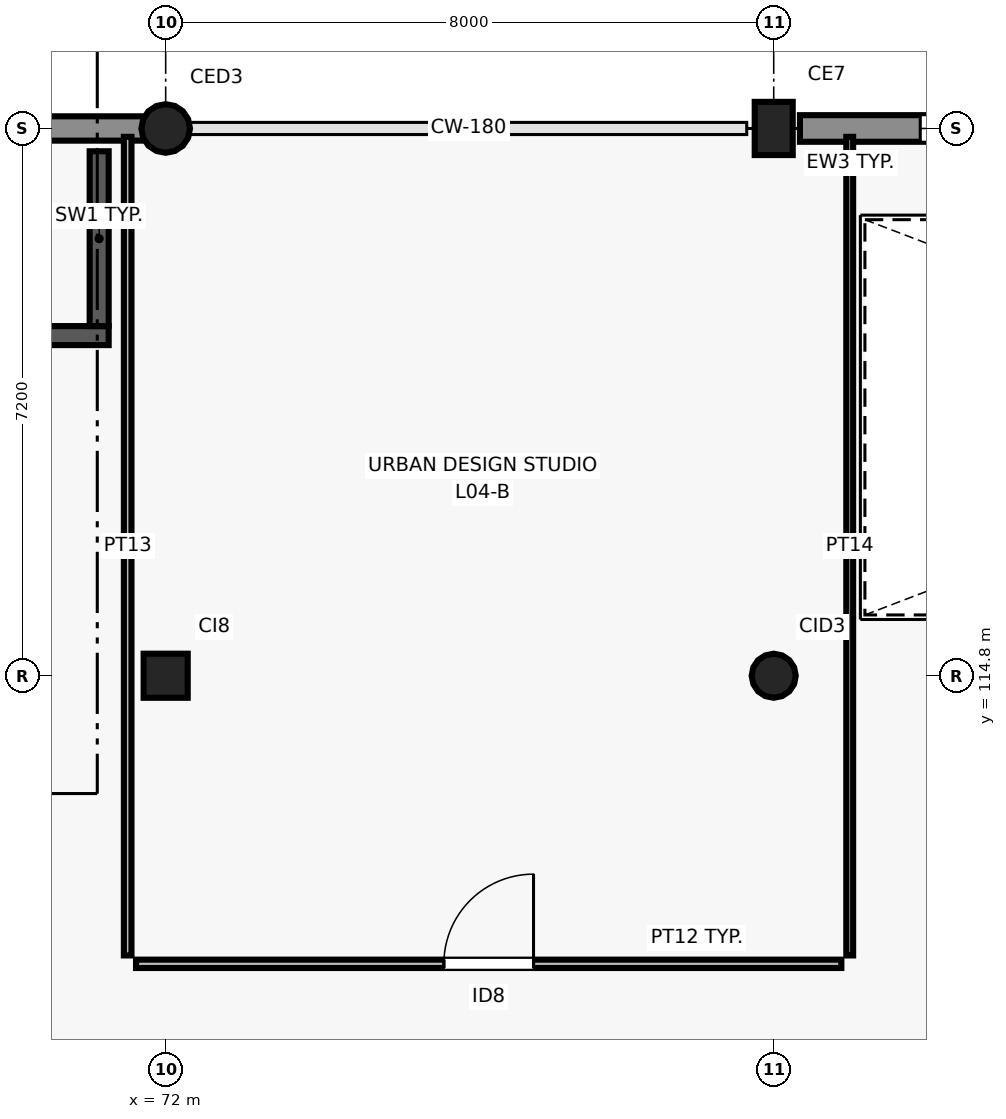
"""IFC4 building model, lengths in metres.
Left out: names, types, materials, properties, quantities, classifications, styles, units other than length and angle.
Written with IfcOpenShell. Run it as: python <this file> out.ifc"""

import sys

from ifc_helpers import new_model, si_unit, direction, frame, frame_2d, origin, origin_2d, place, context, subcontext, project, spatial, rectangle, circle, extrude, element, fill, save


model = new_model("IFC4")
c1 = context("Model", 3, precision=1e-05, world=origin(), true_north=direction((0.0, 1.0)))
c2 = subcontext(c1, "Body", "Model", "MODEL_VIEW")
j1 = project(units=[si_unit("LENGTHUNIT", "METRE"), si_unit("PLANEANGLEUNIT", "RADIAN")], contexts=[c1])
p1 = place(None, origin())
s1 = spatial("IfcSite", under=j1, at=p1, CompositionType="ELEMENT")
p2 = place(p1, origin())
s2 = spatial("IfcBuilding", under=s1, at=p2, CompositionType="ELEMENT")
p3 = place(p2, frame((0.0, 0.0, 17.4)))
s3 = spatial("IfcBuildingStorey", under=s2, at=p3, CompositionType="ELEMENT", Elevation=17.4)
p4 = place(p3, frame((72.0, 114.8, 0.0), z_axis=(0.0, 0.0, 1.0), x_axis=(1.0, 0.0, 0.0)))
e1 = element("IfcColumn", 1, at=p4, inside=s3, PredefinedType="COLUMN", context=c2, shape_type="SweptSolid", body=[
    extrude(rectangle(XDim=0.58, YDim=0.58, at=origin_2d()), origin(), (0.0, 0.0, 1.0), 4.2),
])
p5 = place(p3, frame((72.0, 122.0, 0.0), z_axis=(0.0, 0.0, 1.0), x_axis=(1.0, 0.0, 0.0)))
e2 = element("IfcColumn", 2, at=p5, inside=s3, PredefinedType="COLUMN", context=c2, shape_type="SweptSolid", body=[
    extrude(circle(Radius=0.32, at=origin_2d()), origin(), (0.0, 0.0, 1.0), 4.2),
])
p6 = place(p3, frame((80.0, 114.8, 0.0), z_axis=(0.0, 0.0, 1.0), x_axis=(1.0, 0.0, 0.0)))
e3 = element("IfcColumn", 3, at=p6, inside=s3, PredefinedType="COLUMN", context=c2, shape_type="SweptSolid", body=[
    extrude(circle(Radius=0.29, at=origin_2d()), origin(), (0.0, 0.0, 1.0), 4.2),
])
p7 = place(p3, frame((80.0, 122.0, 0.0), z_axis=(0.0, 0.0, 1.0), x_axis=(1.0, 0.0, 0.0)))
e4 = element("IfcColumn", 4, at=p7, inside=s3, PredefinedType="COLUMN", context=c2, shape_type="SweptSolid", body=[
    extrude(rectangle(XDim=0.7, YDim=0.5, at=origin_2d()), origin(), (0.0, 0.0, 1.0), 4.2),
])
p8 = place(p3, frame((87.665, 122.0, 0.0), z_axis=(0.0, 0.0, 1.0), x_axis=(-1.0, 0.0, 0.0)))
e5 = element("IfcWall", 5, at=p8, inside=s3, PredefinedType="SOLIDWALL", context=c2, shape_type="SweptSolid", body=[
    extrude(rectangle(XDim=7.32, YDim=0.35, at=frame_2d((3.66, 0.0))), origin(), (0.0, 0.0, 1.0), 3.37),
])
p9 = place(p8, frame((0.928, 0.0, 0.9)))
e6 = element("IfcOpeningElement", 6, at=p9, cuts=e5, PredefinedType="OPENING", context=c2, shape_type="SweptSolid", body=[
    extrude(rectangle(XDim=2.1, YDim=1.25, at=frame_2d((1.05, 0.625))), frame((0.0, 0.185, 0.0), z_axis=(0.0, -1.0, 0.0), x_axis=(1.0, 0.0, 0.0)), (0.0, 0.0, 1.0), 0.37),
])
p10 = place(p8, frame((3.637, 0.0, 0.9)))
e7 = element("IfcOpeningElement", 7, at=p10, cuts=e5, PredefinedType="OPENING", context=c2, shape_type="SweptSolid", body=[
    extrude(rectangle(XDim=2.1, YDim=1.25, at=frame_2d((1.05, 0.625))), frame((0.0, 0.185, 0.0), z_axis=(0.0, -1.0, 0.0), x_axis=(1.0, 0.0, 0.0)), (0.0, 0.0, 1.0), 0.37),
])
p11 = place(p3, frame((71.731, 122.0, 0.0), z_axis=(0.0, 0.0, 1.0), x_axis=(-1.0, 0.0, 0.0)))
e8 = element("IfcWall", 8, at=p11, inside=s3, PredefinedType="SOLIDWALL", context=c2, shape_type="SweptSolid", body=[
    extrude(rectangle(XDim=7.396, YDim=0.32, at=frame_2d((3.698, 0.0))), origin(), (0.0, 0.0, 1.0), 3.92),
])
p12 = place(p3, frame((68.75, 119.275, 0.0), z_axis=(0.0, 0.0, 1.0), x_axis=(1.0, 0.0, 0.0)))
e9 = element("IfcWall", 9, at=p12, inside=s3, PredefinedType="SHEAR", context=c2, shape_type="SweptSolid", body=[
    extrude(rectangle(XDim=2.5, YDim=0.25, at=frame_2d((1.25, 0.0))), origin(), (0.0, 0.0, 1.0), 3.92),
])
p13 = place(p12, frame((0.8, 0.0, 0.0)))
e10 = element("IfcOpeningElement", 10, at=p13, cuts=e9, PredefinedType="OPENING", context=c2, shape_type="SweptSolid", body=[
    extrude(rectangle(XDim=0.9, YDim=2.05, at=frame_2d((0.45, 1.025))), frame((0.0, 0.135, 0.0), z_axis=(0.0, -1.0, 0.0), x_axis=(1.0, 0.0, 0.0)), (0.0, 0.0, 1.0), 0.27),
])
p14 = place(p3, frame((71.125, 119.4, 0.0), z_axis=(0.0, 0.0, 1.0), x_axis=(0.0, 1.0, 0.0)))
e11 = element("IfcWall", 11, at=p14, inside=s3, PredefinedType="SHEAR", context=c2, shape_type="SweptSolid", body=[
    extrude(rectangle(XDim=2.3, YDim=0.25, at=frame_2d((1.15, 0.0))), origin(), (0.0, 0.0, 1.0), 3.92),
])
p15 = place(p3, frame((71.61, 111.01, 0.0), z_axis=(0.0, 0.0, 1.0), x_axis=(1.0, 0.0, 0.0)))
e12 = element("IfcWall", 12, at=p15, inside=s3, PredefinedType="PARTITIONING", context=c2, shape_type="SweptSolid", body=[
    extrude(rectangle(XDim=9.28, YDim=0.11, at=frame_2d((4.64, 0.0))), origin(), (0.0, 0.0, 1.0), 3.9),
])
p16 = place(p15, frame((4.05, 0.0, 0.0)))
e13 = element("IfcOpeningElement", 13, at=p16, cuts=e12, PredefinedType="OPENING", context=c2, shape_type="SweptSolid", body=[
    extrude(rectangle(XDim=1.18, YDim=2.2, at=frame_2d((0.59, 1.1))), frame((0.0, 0.065, 0.0), z_axis=(0.0, -1.0, 0.0), x_axis=(1.0, 0.0, 0.0)), (0.0, 0.0, 1.0), 0.13),
])
p17 = place(p3, frame((71.5, 111.12, 0.0), z_axis=(0.0, 0.0, 1.0), x_axis=(0.0, 1.0, 0.0)))
e14 = element("IfcWall", 14, at=p17, inside=s3, PredefinedType="PARTITIONING", context=c2, shape_type="SweptSolid", body=[
    extrude(rectangle(XDim=10.77, YDim=0.1, at=frame_2d((5.385, 0.0))), origin(), (0.0, 0.0, 1.0), 3.9),
])
p18 = place(p3, frame((81.0, 111.12, 0.0), z_axis=(0.0, 0.0, 1.0), x_axis=(0.0, 1.0, 0.0)))
e15 = element("IfcWall", 15, at=p18, inside=s3, PredefinedType="PARTITIONING", context=c2, shape_type="SweptSolid", body=[
    extrude(rectangle(XDim=10.77, YDim=0.09, at=frame_2d((5.385, 0.0))), origin(), (0.0, 0.0, 1.0), 3.9),
])
p19 = place(p10, origin())
e16 = element("IfcWindow", 16, at=p19, inside=s3, PartitioningType="SINGLE_PANEL", PredefinedType="WINDOW", context=c2, shape_type="SweptSolid", body=[
    extrude(rectangle(XDim=2.1, YDim=1.25, at=frame_2d((1.05, 0.625))), frame((0.0, 0.03, 0.0), z_axis=(0.0, -1.0, 0.0), x_axis=(1.0, 0.0, 0.0)), (0.0, 0.0, 1.0), 0.06),
])
fill(e7, e16)
p20 = place(p16, origin())
e17 = element("IfcDoor", 17, at=p20, inside=s3, OperationType="SINGLE_SWING_RIGHT", PredefinedType="DOOR", context=c2, shape_type="SweptSolid", body=[
    extrude(rectangle(XDim=1.18, YDim=2.2, at=frame_2d((0.59, 1.1))), frame((0.0, 0.025, 0.0), z_axis=(0.0, -1.0, 0.0), x_axis=(1.0, 0.0, 0.0)), (0.0, 0.0, 1.0), 0.05),
])
fill(e13, e17)
save(model, sys.argv[1])
